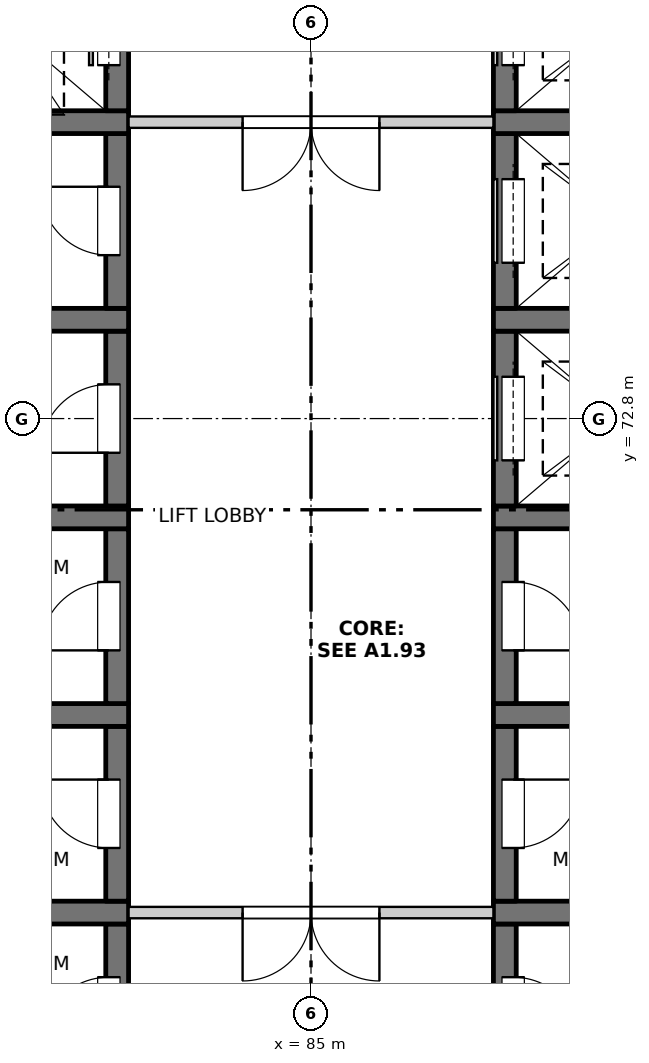
"""IFC4 building model, lengths in metres.
Left out: names, types, materials, properties, quantities, classifications, styles, units other than length and angle.
Written with IfcOpenShell. Run it as: python <this file> out.ifc"""

import sys

from ifc_helpers import new_model, si_unit, direction, frame, frame_2d, origin, place, context, subcontext, project, spatial, rectangle, extrude, element, fill, save


model = new_model("IFC4")
c1 = context("Model", 3, precision=1e-05, world=origin(), true_north=direction((0.0, 1.0)))
c2 = subcontext(c1, "Body", "Model", "MODEL_VIEW")
j1 = project(units=[si_unit("LENGTHUNIT", "METRE"), si_unit("PLANEANGLEUNIT", "RADIAN")], contexts=[c1])
p1 = place(None, origin())
s1 = spatial("IfcSite", under=j1, at=p1, CompositionType="ELEMENT")
p2 = place(p1, origin())
s2 = spatial("IfcBuilding", under=s1, at=p2, CompositionType="ELEMENT")
p3 = place(p2, frame((0.0, 0.0, 148.6)))
s3 = spatial("IfcBuildingStorey", under=s2, at=p3, CompositionType="ELEMENT", Elevation=148.6)
p4 = place(p3, frame((82.45, 63.85, -0.3), z_axis=(0.0, 0.0, 1.0), x_axis=(0.0, 1.0, 0.0)))
e1 = element("IfcWall", 1, at=p4, inside=s3, PredefinedType="SOLIDWALL", context=c2, shape_type="SweptSolid", body=[
    extrude(rectangle(XDim=2.3, YDim=0.3, at=frame_2d((1.15, 0.0))), origin(), (0.0, 0.0, 1.0), 3.45),
])
p5 = place(p4, frame((0.7, 0.0, 0.3)))
e2 = element("IfcOpeningElement", 2, at=p5, cuts=e1, PredefinedType="OPENING", context=c2, shape_type="SweptSolid", body=[
    extrude(rectangle(XDim=0.9, YDim=2.1, at=frame_2d((0.45, 1.05))), frame((0.0, 0.16, 0.0), z_axis=(0.0, -1.0, 0.0), x_axis=(1.0, 0.0, 0.0)), (0.0, 0.0, 1.0), 0.32),
])
p6 = place(p3, frame((79.6, 66.3, -0.3), z_axis=(0.0, 0.0, 1.0), x_axis=(1.0, 0.0, 0.0)))
e3 = element("IfcWall", 3, at=p6, inside=s3, PredefinedType="SOLIDWALL", context=c2, shape_type="SweptSolid", body=[
    extrude(rectangle(XDim=3.0, YDim=0.3, at=frame_2d((1.5, 0.0))), origin(), (0.0, 0.0, 1.0), 3.45),
])
p7 = place(p3, frame((82.45, 66.45, -0.3), z_axis=(0.0, 0.0, 1.0), x_axis=(0.0, 1.0, 0.0)))
e4 = element("IfcWall", 4, at=p7, inside=s3, PredefinedType="SOLIDWALL", context=c2, shape_type="SweptSolid", body=[
    extrude(rectangle(XDim=2.3, YDim=0.3, at=frame_2d((1.15, 0.0))), origin(), (0.0, 0.0, 1.0), 3.45),
])
p8 = place(p7, frame((0.7, 0.0, 0.3)))
e5 = element("IfcOpeningElement", 5, at=p8, cuts=e4, PredefinedType="OPENING", context=c2, shape_type="SweptSolid", body=[
    extrude(rectangle(XDim=0.9, YDim=2.1, at=frame_2d((0.45, 1.05))), frame((0.0, 0.16, 0.0), z_axis=(0.0, -1.0, 0.0), x_axis=(1.0, 0.0, 0.0)), (0.0, 0.0, 1.0), 0.32),
])
p9 = place(p3, frame((79.6, 68.9, -0.3), z_axis=(0.0, 0.0, 1.0), x_axis=(1.0, 0.0, 0.0)))
e6 = element("IfcWall", 6, at=p9, inside=s3, PredefinedType="SOLIDWALL", context=c2, shape_type="SweptSolid", body=[
    extrude(rectangle(XDim=3.0, YDim=0.3, at=frame_2d((1.5, 0.0))), origin(), (0.0, 0.0, 1.0), 3.45),
])
p10 = place(p3, frame((82.45, 69.05, -0.3), z_axis=(0.0, 0.0, 1.0), x_axis=(0.0, 1.0, 0.0)))
e7 = element("IfcWall", 7, at=p10, inside=s3, PredefinedType="SOLIDWALL", context=c2, shape_type="SweptSolid", body=[
    extrude(rectangle(XDim=2.3, YDim=0.3, at=frame_2d((1.15, 0.0))), origin(), (0.0, 0.0, 1.0), 3.45),
])
p11 = place(p10, frame((0.7, 0.0, 0.3)))
e8 = element("IfcOpeningElement", 8, at=p11, cuts=e7, PredefinedType="OPENING", context=c2, shape_type="SweptSolid", body=[
    extrude(rectangle(XDim=0.9, YDim=2.1, at=frame_2d((0.45, 1.05))), frame((0.0, 0.16, 0.0), z_axis=(0.0, -1.0, 0.0), x_axis=(1.0, 0.0, 0.0)), (0.0, 0.0, 1.0), 0.32),
])
p12 = place(p3, frame((79.6, 71.5, -0.3), z_axis=(0.0, 0.0, 1.0), x_axis=(1.0, 0.0, 0.0)))
e9 = element("IfcWall", 9, at=p12, inside=s3, PredefinedType="SOLIDWALL", context=c2, shape_type="SweptSolid", body=[
    extrude(rectangle(XDim=3.0, YDim=0.3, at=frame_2d((1.5, 0.0))), origin(), (0.0, 0.0, 1.0), 3.45),
])
p13 = place(p3, frame((82.45, 71.65, -0.3), z_axis=(0.0, 0.0, 1.0), x_axis=(0.0, 1.0, 0.0)))
e10 = element("IfcWall", 10, at=p13, inside=s3, PredefinedType="SOLIDWALL", context=c2, shape_type="SweptSolid", body=[
    extrude(rectangle(XDim=2.3, YDim=0.3, at=frame_2d((1.15, 0.0))), origin(), (0.0, 0.0, 1.0), 3.45),
])
p14 = place(p13, frame((0.7, 0.0, 0.3)))
e11 = element("IfcOpeningElement", 11, at=p14, cuts=e10, PredefinedType="OPENING", context=c2, shape_type="SweptSolid", body=[
    extrude(rectangle(XDim=0.9, YDim=2.1, at=frame_2d((0.45, 1.05))), frame((0.0, 0.16, 0.0), z_axis=(0.0, -1.0, 0.0), x_axis=(1.0, 0.0, 0.0)), (0.0, 0.0, 1.0), 0.32),
])
p15 = place(p3, frame((79.6, 74.1, -0.3), z_axis=(0.0, 0.0, 1.0), x_axis=(1.0, 0.0, 0.0)))
e12 = element("IfcWall", 12, at=p15, inside=s3, PredefinedType="SOLIDWALL", context=c2, shape_type="SweptSolid", body=[
    extrude(rectangle(XDim=3.0, YDim=0.3, at=frame_2d((1.5, 0.0))), origin(), (0.0, 0.0, 1.0), 3.45),
])
p16 = place(p3, frame((82.45, 74.25, -0.3), z_axis=(0.0, 0.0, 1.0), x_axis=(0.0, 1.0, 0.0)))
e13 = element("IfcWall", 13, at=p16, inside=s3, PredefinedType="SOLIDWALL", context=c2, shape_type="SweptSolid", body=[
    extrude(rectangle(XDim=2.3, YDim=0.3, at=frame_2d((1.15, 0.0))), origin(), (0.0, 0.0, 1.0), 3.45),
])
p17 = place(p16, frame((0.7, 0.0, 0.3)))
e14 = element("IfcOpeningElement", 14, at=p17, cuts=e13, PredefinedType="OPENING", context=c2, shape_type="SweptSolid", body=[
    extrude(rectangle(XDim=0.9, YDim=2.1, at=frame_2d((0.45, 1.05))), frame((0.0, 0.16, 0.0), z_axis=(0.0, -1.0, 0.0), x_axis=(1.0, 0.0, 0.0)), (0.0, 0.0, 1.0), 0.32),
])
p18 = place(p3, frame((79.6, 76.7, -0.3), z_axis=(0.0, 0.0, 1.0), x_axis=(1.0, 0.0, 0.0)))
e15 = element("IfcWall", 15, at=p18, inside=s3, PredefinedType="SOLIDWALL", context=c2, shape_type="SweptSolid", body=[
    extrude(rectangle(XDim=3.0, YDim=0.3, at=frame_2d((1.5, 0.0))), origin(), (0.0, 0.0, 1.0), 3.45),
])
p19 = place(p3, frame((82.45, 76.85, -0.3), z_axis=(0.0, 0.0, 1.0), x_axis=(0.0, 1.0, 0.0)))
e16 = element("IfcWall", 16, at=p19, inside=s3, PredefinedType="SOLIDWALL", context=c2, shape_type="SweptSolid", body=[
    extrude(rectangle(XDim=2.3, YDim=0.3, at=frame_2d((1.15, 0.0))), origin(), (0.0, 0.0, 1.0), 3.45),
])
p20 = place(p19, frame((0.6, 0.0, 0.3)))
e17 = element("IfcOpeningElement", 17, at=p20, cuts=e16, PredefinedType="OPENING", context=c2, shape_type="SweptSolid", body=[
    extrude(rectangle(XDim=1.1, YDim=2.1, at=frame_2d((0.55, 1.05))), frame((0.0, 0.16, 0.0), z_axis=(0.0, -1.0, 0.0), x_axis=(1.0, 0.0, 0.0)), (0.0, 0.0, 1.0), 0.32),
])
p21 = place(p3, frame((87.55, 63.85, -0.3), z_axis=(0.0, 0.0, 1.0), x_axis=(0.0, 1.0, 0.0)))
e18 = element("IfcWall", 18, at=p21, inside=s3, PredefinedType="SOLIDWALL", context=c2, shape_type="SweptSolid", body=[
    extrude(rectangle(XDim=2.3, YDim=0.3, at=frame_2d((1.15, 0.0))), origin(), (0.0, 0.0, 1.0), 3.45),
])
p22 = place(p21, frame((0.7, 0.0, 0.3)))
e19 = element("IfcOpeningElement", 19, at=p22, cuts=e18, PredefinedType="OPENING", context=c2, shape_type="SweptSolid", body=[
    extrude(rectangle(XDim=0.9, YDim=2.1, at=frame_2d((0.45, 1.05))), frame((0.0, 0.16, 0.0), z_axis=(0.0, -1.0, 0.0), x_axis=(1.0, 0.0, 0.0)), (0.0, 0.0, 1.0), 0.32),
])
p23 = place(p3, frame((87.4, 66.3, -0.3), z_axis=(0.0, 0.0, 1.0), x_axis=(1.0, 0.0, 0.0)))
e20 = element("IfcWall", 20, at=p23, inside=s3, PredefinedType="SOLIDWALL", context=c2, shape_type="SweptSolid", body=[
    extrude(rectangle(XDim=3.0, YDim=0.3, at=frame_2d((1.5, 0.0))), origin(), (0.0, 0.0, 1.0), 3.45),
])
p24 = place(p3, frame((87.55, 66.45, -0.3), z_axis=(0.0, 0.0, 1.0), x_axis=(0.0, 1.0, 0.0)))
e21 = element("IfcWall", 21, at=p24, inside=s3, PredefinedType="SOLIDWALL", context=c2, shape_type="SweptSolid", body=[
    extrude(rectangle(XDim=2.3, YDim=0.3, at=frame_2d((1.15, 0.0))), origin(), (0.0, 0.0, 1.0), 3.45),
])
p25 = place(p24, frame((0.7, 0.0, 0.3)))
e22 = element("IfcOpeningElement", 22, at=p25, cuts=e21, PredefinedType="OPENING", context=c2, shape_type="SweptSolid", body=[
    extrude(rectangle(XDim=0.9, YDim=2.1, at=frame_2d((0.45, 1.05))), frame((0.0, 0.16, 0.0), z_axis=(0.0, -1.0, 0.0), x_axis=(1.0, 0.0, 0.0)), (0.0, 0.0, 1.0), 0.32),
])
p26 = place(p3, frame((87.4, 68.9, -0.3), z_axis=(0.0, 0.0, 1.0), x_axis=(1.0, 0.0, 0.0)))
e23 = element("IfcWall", 23, at=p26, inside=s3, PredefinedType="SOLIDWALL", context=c2, shape_type="SweptSolid", body=[
    extrude(rectangle(XDim=3.0, YDim=0.3, at=frame_2d((1.5, 0.0))), origin(), (0.0, 0.0, 1.0), 3.45),
])
p27 = place(p3, frame((87.55, 69.05, -0.3), z_axis=(0.0, 0.0, 1.0), x_axis=(0.0, 1.0, 0.0)))
e24 = element("IfcWall", 24, at=p27, inside=s3, PredefinedType="SOLIDWALL", context=c2, shape_type="SweptSolid", body=[
    extrude(rectangle(XDim=2.3, YDim=0.3, at=frame_2d((1.15, 0.0))), origin(), (0.0, 0.0, 1.0), 3.45),
])
p28 = place(p27, frame((0.7, 0.0, 0.3)))
e25 = element("IfcOpeningElement", 25, at=p28, cuts=e24, PredefinedType="OPENING", context=c2, shape_type="SweptSolid", body=[
    extrude(rectangle(XDim=0.9, YDim=2.1, at=frame_2d((0.45, 1.05))), frame((0.0, 0.16, 0.0), z_axis=(0.0, -1.0, 0.0), x_axis=(1.0, 0.0, 0.0)), (0.0, 0.0, 1.0), 0.32),
])
p29 = place(p3, frame((87.4, 71.5, -0.3), z_axis=(0.0, 0.0, 1.0), x_axis=(1.0, 0.0, 0.0)))
e26 = element("IfcWall", 26, at=p29, inside=s3, PredefinedType="SOLIDWALL", context=c2, shape_type="SweptSolid", body=[
    extrude(rectangle(XDim=3.0, YDim=0.3, at=frame_2d((1.5, 0.0))), origin(), (0.0, 0.0, 1.0), 3.45),
])
p30 = place(p3, frame((87.55, 71.65, -0.3), z_axis=(0.0, 0.0, 1.0), x_axis=(0.0, 1.0, 0.0)))
e27 = element("IfcWall", 27, at=p30, inside=s3, PredefinedType="SOLIDWALL", context=c2, shape_type="SweptSolid", body=[
    extrude(rectangle(XDim=2.3, YDim=0.3, at=frame_2d((1.15, 0.0))), origin(), (0.0, 0.0, 1.0), 3.45),
])
p31 = place(p30, frame((0.6, 0.0, 0.3)))
e28 = element("IfcOpeningElement", 28, at=p31, cuts=e27, PredefinedType="OPENING", context=c2, shape_type="SweptSolid", body=[
    extrude(rectangle(XDim=1.1, YDim=2.1, at=frame_2d((0.55, 1.05))), frame((0.0, 0.16, 0.0), z_axis=(0.0, -1.0, 0.0), x_axis=(1.0, 0.0, 0.0)), (0.0, 0.0, 1.0), 0.32),
])
p32 = place(p3, frame((87.4, 74.1, -0.3), z_axis=(0.0, 0.0, 1.0), x_axis=(1.0, 0.0, 0.0)))
e29 = element("IfcWall", 29, at=p32, inside=s3, PredefinedType="SOLIDWALL", context=c2, shape_type="SweptSolid", body=[
    extrude(rectangle(XDim=3.0, YDim=0.3, at=frame_2d((1.5, 0.0))), origin(), (0.0, 0.0, 1.0), 3.45),
])
p33 = place(p3, frame((87.55, 74.25, -0.3), z_axis=(0.0, 0.0, 1.0), x_axis=(0.0, 1.0, 0.0)))
e30 = element("IfcWall", 30, at=p33, inside=s3, PredefinedType="SOLIDWALL", context=c2, shape_type="SweptSolid", body=[
    extrude(rectangle(XDim=2.3, YDim=0.3, at=frame_2d((1.15, 0.0))), origin(), (0.0, 0.0, 1.0), 3.45),
])
p34 = place(p33, frame((0.6, 0.0, 0.3)))
e31 = element("IfcOpeningElement", 31, at=p34, cuts=e30, PredefinedType="OPENING", context=c2, shape_type="SweptSolid", body=[
    extrude(rectangle(XDim=1.1, YDim=2.1, at=frame_2d((0.55, 1.05))), frame((0.0, 0.16, 0.0), z_axis=(0.0, -1.0, 0.0), x_axis=(1.0, 0.0, 0.0)), (0.0, 0.0, 1.0), 0.32),
])
p35 = place(p3, frame((87.4, 76.7, -0.3), z_axis=(0.0, 0.0, 1.0), x_axis=(1.0, 0.0, 0.0)))
e32 = element("IfcWall", 32, at=p35, inside=s3, PredefinedType="SOLIDWALL", context=c2, shape_type="SweptSolid", body=[
    extrude(rectangle(XDim=3.0, YDim=0.3, at=frame_2d((1.5, 0.0))), origin(), (0.0, 0.0, 1.0), 3.45),
])
p36 = place(p3, frame((87.55, 76.85, -0.3), z_axis=(0.0, 0.0, 1.0), x_axis=(0.0, 1.0, 0.0)))
e33 = element("IfcWall", 33, at=p36, inside=s3, PredefinedType="SOLIDWALL", context=c2, shape_type="SweptSolid", body=[
    extrude(rectangle(XDim=2.3, YDim=0.3, at=frame_2d((1.15, 0.0))), origin(), (0.0, 0.0, 1.0), 3.45),
])
p37 = place(p36, frame((0.6, 0.0, 0.3)))
e34 = element("IfcOpeningElement", 34, at=p37, cuts=e33, PredefinedType="OPENING", context=c2, shape_type="SweptSolid", body=[
    extrude(rectangle(XDim=1.1, YDim=2.1, at=frame_2d((0.55, 1.05))), frame((0.0, 0.16, 0.0), z_axis=(0.0, -1.0, 0.0), x_axis=(1.0, 0.0, 0.0)), (0.0, 0.0, 1.0), 0.32),
])
p38 = place(p3, frame((82.6, 66.3, 0.0), z_axis=(0.0, 0.0, 1.0), x_axis=(1.0, 0.0, 0.0)))
e35 = element("IfcWall", 35, at=p38, inside=s3, PredefinedType="PARTITIONING", context=c2, shape_type="SweptSolid", body=[
    extrude(rectangle(XDim=4.8, YDim=0.15, at=frame_2d((2.4, 0.0))), origin(), (0.0, 0.0, 1.0), 3.15),
])
p39 = place(p38, frame((1.5, 0.0, 0.0)))
e36 = element("IfcOpeningElement", 36, at=p39, cuts=e35, PredefinedType="OPENING", context=c2, shape_type="SweptSolid", body=[
    extrude(rectangle(XDim=1.8, YDim=2.1, at=frame_2d((0.9, 1.05))), frame((0.0, 0.085, 0.0), z_axis=(0.0, -1.0, 0.0), x_axis=(1.0, 0.0, 0.0)), (0.0, 0.0, 1.0), 0.17),
])
p40 = place(p3, frame((82.6, 76.7, 0.0), z_axis=(0.0, 0.0, 1.0), x_axis=(1.0, 0.0, 0.0)))
e37 = element("IfcWall", 37, at=p40, inside=s3, PredefinedType="PARTITIONING", context=c2, shape_type="SweptSolid", body=[
    extrude(rectangle(XDim=4.8, YDim=0.15, at=frame_2d((2.4, 0.0))), origin(), (0.0, 0.0, 1.0), 3.15),
])
p41 = place(p40, frame((1.5, 0.0, 0.0)))
e38 = element("IfcOpeningElement", 38, at=p41, cuts=e37, PredefinedType="OPENING", context=c2, shape_type="SweptSolid", body=[
    extrude(rectangle(XDim=1.8, YDim=2.1, at=frame_2d((0.9, 1.05))), frame((0.0, 0.085, 0.0), z_axis=(0.0, -1.0, 0.0), x_axis=(1.0, 0.0, 0.0)), (0.0, 0.0, 1.0), 0.17),
])
p42 = place(p5, origin())
e39 = element("IfcDoor", 39, at=p42, inside=s3, OperationType="SINGLE_SWING_LEFT", PredefinedType="DOOR", context=c2, shape_type="SweptSolid", body=[
    extrude(rectangle(XDim=0.9, YDim=2.1, at=frame_2d((0.45, 1.05))), frame((0.0, 0.135, 0.0), z_axis=(0.0, -1.0, 0.0), x_axis=(1.0, 0.0, 0.0)), (0.0, 0.0, 1.0), 0.05),
])
fill(e2, e39)
p43 = place(p22, origin())
e40 = element("IfcDoor", 40, at=p43, inside=s3, OperationType="SINGLE_SWING_RIGHT", PredefinedType="DOOR", context=c2, shape_type="SweptSolid", body=[
    extrude(rectangle(XDim=0.9, YDim=2.1, at=frame_2d((0.45, 1.05))), frame((0.0, -0.085, 0.0), z_axis=(0.0, -1.0, 0.0), x_axis=(1.0, 0.0, 0.0)), (0.0, 0.0, 1.0), 0.05),
])
fill(e19, e40)
p44 = place(p39, origin())
e41 = element("IfcDoor", 41, at=p44, inside=s3, OperationType="DOUBLE_DOOR_SINGLE_SWING", PredefinedType="DOOR", context=c2, shape_type="SweptSolid", body=[
    extrude(rectangle(XDim=1.8, YDim=2.1, at=frame_2d((0.9, 1.05))), frame((0.0, 0.025, 0.0), z_axis=(0.0, -1.0, 0.0), x_axis=(1.0, 0.0, 0.0)), (0.0, 0.0, 1.0), 0.05),
])
fill(e36, e41)
p45 = place(p8, origin())
e42 = element("IfcDoor", 42, at=p45, inside=s3, OperationType="SINGLE_SWING_RIGHT", PredefinedType="DOOR", context=c2, shape_type="SweptSolid", body=[
    extrude(rectangle(XDim=0.9, YDim=2.1, at=frame_2d((0.45, 1.05))), frame((0.0, 0.135, 0.0), z_axis=(0.0, -1.0, 0.0), x_axis=(1.0, 0.0, 0.0)), (0.0, 0.0, 1.0), 0.05),
])
fill(e5, e42)
p46 = place(p25, origin())
e43 = element("IfcDoor", 43, at=p46, inside=s3, OperationType="SINGLE_SWING_LEFT", PredefinedType="DOOR", context=c2, shape_type="SweptSolid", body=[
    extrude(rectangle(XDim=0.9, YDim=2.1, at=frame_2d((0.45, 1.05))), frame((0.0, -0.085, 0.0), z_axis=(0.0, -1.0, 0.0), x_axis=(1.0, 0.0, 0.0)), (0.0, 0.0, 1.0), 0.05),
])
fill(e22, e43)
p47 = place(p11, origin())
e44 = element("IfcDoor", 44, at=p47, inside=s3, OperationType="SINGLE_SWING_LEFT", PredefinedType="DOOR", context=c2, shape_type="SweptSolid", body=[
    extrude(rectangle(XDim=0.9, YDim=2.1, at=frame_2d((0.45, 1.05))), frame((0.0, 0.135, 0.0), z_axis=(0.0, -1.0, 0.0), x_axis=(1.0, 0.0, 0.0)), (0.0, 0.0, 1.0), 0.05),
])
fill(e8, e44)
p48 = place(p28, origin())
e45 = element("IfcDoor", 45, at=p48, inside=s3, OperationType="SINGLE_SWING_RIGHT", PredefinedType="DOOR", context=c2, shape_type="SweptSolid", body=[
    extrude(rectangle(XDim=0.9, YDim=2.1, at=frame_2d((0.45, 1.05))), frame((0.0, -0.085, 0.0), z_axis=(0.0, -1.0, 0.0), x_axis=(1.0, 0.0, 0.0)), (0.0, 0.0, 1.0), 0.05),
])
fill(e25, e45)
p49 = place(p14, origin())
e46 = element("IfcDoor", 46, at=p49, inside=s3, OperationType="SINGLE_SWING_LEFT", PredefinedType="DOOR", context=c2, shape_type="SweptSolid", body=[
    extrude(rectangle(XDim=0.9, YDim=2.1, at=frame_2d((0.45, 1.05))), frame((0.0, 0.135, 0.0), z_axis=(0.0, -1.0, 0.0), x_axis=(1.0, 0.0, 0.0)), (0.0, 0.0, 1.0), 0.05),
])
fill(e11, e46)
p50 = place(p31, origin())
e47 = element("IfcDoor", 47, at=p50, inside=s3, OperationType="SLIDING_TO_LEFT", PredefinedType="DOOR", context=c2, shape_type="SweptSolid", body=[
    extrude(rectangle(XDim=1.1, YDim=2.1, at=frame_2d((0.55, 1.05))), frame((0.0, -0.085, 0.0), z_axis=(0.0, -1.0, 0.0), x_axis=(1.0, 0.0, 0.0)), (0.0, 0.0, 1.0), 0.05),
])
fill(e28, e47)
p51 = place(p17, origin())
e48 = element("IfcDoor", 48, at=p51, inside=s3, OperationType="SINGLE_SWING_RIGHT", PredefinedType="DOOR", context=c2, shape_type="SweptSolid", body=[
    extrude(rectangle(XDim=0.9, YDim=2.1, at=frame_2d((0.45, 1.05))), frame((0.0, 0.135, 0.0), z_axis=(0.0, -1.0, 0.0), x_axis=(1.0, 0.0, 0.0)), (0.0, 0.0, 1.0), 0.05),
])
fill(e14, e48)
p52 = place(p34, origin())
e49 = element("IfcDoor", 49, at=p52, inside=s3, OperationType="SLIDING_TO_LEFT", PredefinedType="DOOR", context=c2, shape_type="SweptSolid", body=[
    extrude(rectangle(XDim=1.1, YDim=2.1, at=frame_2d((0.55, 1.05))), frame((0.0, -0.085, 0.0), z_axis=(0.0, -1.0, 0.0), x_axis=(1.0, 0.0, 0.0)), (0.0, 0.0, 1.0), 0.05),
])
fill(e31, e49)
p53 = place(p41, origin())
e50 = element("IfcDoor", 50, at=p53, inside=s3, OperationType="DOUBLE_DOOR_SINGLE_SWING", PredefinedType="DOOR", context=c2, shape_type="SweptSolid", body=[
    extrude(rectangle(XDim=1.8, YDim=2.1, at=frame_2d((0.9, 1.05))), frame((0.0, 0.025, 0.0), z_axis=(0.0, -1.0, 0.0), x_axis=(1.0, 0.0, 0.0)), (0.0, 0.0, 1.0), 0.05),
])
fill(e38, e50)
p54 = place(p20, origin())
e51 = element("IfcDoor", 51, at=p54, inside=s3, OperationType="SLIDING_TO_LEFT", PredefinedType="DOOR", context=c2, shape_type="SweptSolid", body=[
    extrude(rectangle(XDim=1.1, YDim=2.1, at=frame_2d((0.55, 1.05))), frame((0.0, 0.135, 0.0), z_axis=(0.0, -1.0, 0.0), x_axis=(1.0, 0.0, 0.0)), (0.0, 0.0, 1.0), 0.05),
])
fill(e17, e51)
p55 = place(p37, origin())
e52 = element("IfcDoor", 52, at=p55, inside=s3, OperationType="SLIDING_TO_LEFT", PredefinedType="DOOR", context=c2, shape_type="SweptSolid", body=[
    extrude(rectangle(XDim=1.1, YDim=2.1, at=frame_2d((0.55, 1.05))), frame((0.0, -0.085, 0.0), z_axis=(0.0, -1.0, 0.0), x_axis=(1.0, 0.0, 0.0)), (0.0, 0.0, 1.0), 0.05),
])
fill(e34, e52)
save(model, sys.argv[1])
